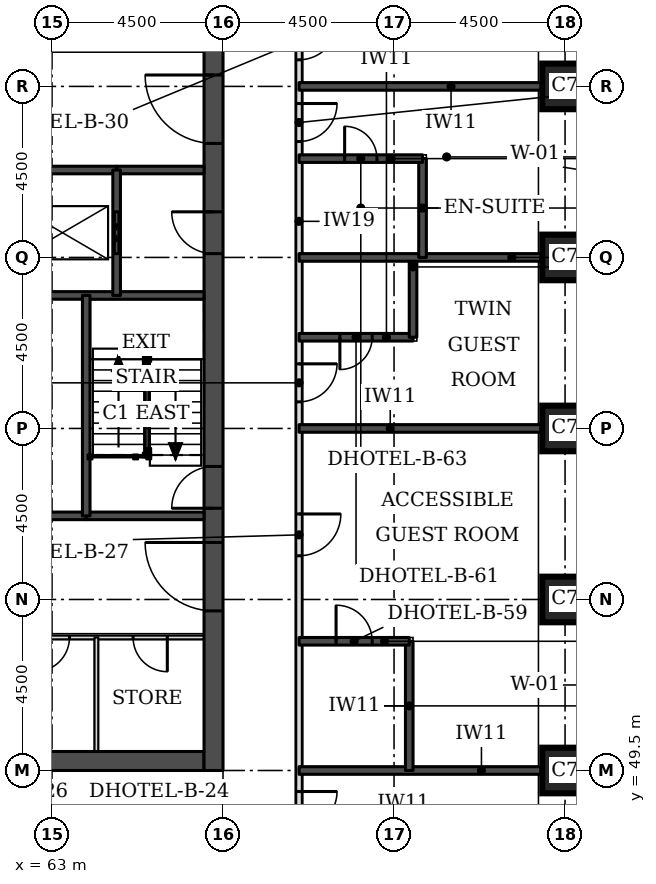
"""IFC4 building model, lengths in metres.
Left out: names, types, materials, properties, quantities, classifications, styles, units other than length and angle.
Written with IfcOpenShell. Run it as: python <this file> out.ifc"""

import sys

from ifc_helpers import new_model, si_unit, direction, frame, frame_2d, origin, origin_2d, place, context, subcontext, project, spatial, rectangle, extrude, element, fill, save


model = new_model("IFC4")
c1 = context("Model", 3, precision=1e-05, world=origin(), true_north=direction((0.0, 1.0)))
c2 = subcontext(c1, "Body", "Model", "MODEL_VIEW")
j1 = project(units=[si_unit("LENGTHUNIT", "METRE"), si_unit("PLANEANGLEUNIT", "RADIAN")], contexts=[c1])
p1 = place(None, origin())
s1 = spatial("IfcSite", under=j1, at=p1, CompositionType="ELEMENT")
p2 = place(p1, origin())
s2 = spatial("IfcBuilding", under=s1, at=p2, CompositionType="ELEMENT")
p3 = place(p2, frame((0.0, 0.0, 52.8)))
s3 = spatial("IfcBuildingStorey", under=s2, at=p3, CompositionType="ELEMENT", Elevation=52.8)
for number, where, z_axis, x_axis in (
    (1, (76.5, 49.5, 0.0), (0.0, 0.0, 1.0), (1.0, 0.0, 0.0)),
    (2, (76.5, 54.0, 0.0), (0.0, 0.0, 1.0), (1.0, 0.0, 0.0)),
    (3, (76.5, 58.5, 0.0), (0.0, 0.0, 1.0), (1.0, 0.0, 0.0)),
    (4, (76.5, 63.0, 0.0), (0.0, 0.0, 1.0), (1.0, 0.0, 0.0)),
    (5, (76.5, 67.5, 0.0), (0.0, 0.0, 1.0), (1.0, 0.0, 0.0)),
):
    element("IfcColumn", number, at=place(p3, frame(where, z_axis=z_axis, x_axis=x_axis)), inside=s3, PredefinedType="COLUMN", context=c2, shape_type="SweptSolid", body=[
        extrude(rectangle(XDim=1.2, YDim=1.2, at=origin_2d()), origin(), (0.0, 0.0, 1.0), 3.3),
    ])
p4 = place(p3, frame((45.5, 49.75, 0.0), z_axis=(0.0, 0.0, 1.0), x_axis=(1.0, 0.0, 0.0)))
e6 = element("IfcWall", 6, at=p4, inside=s3, PredefinedType="SHEAR", context=c2, shape_type="SweptSolid", body=[
    extrude(rectangle(XDim=21.5, YDim=0.5, at=frame_2d((10.75, 0.0))), origin(), (0.0, 0.0, 1.0), 3.3),
])
p5 = place(p3, frame((67.25, 49.5, 0.0), z_axis=(0.0, 0.0, 1.0), x_axis=(0.0, 1.0, 0.0)))
e7 = element("IfcWall", 7, at=p5, inside=s3, PredefinedType="SHEAR", context=c2, shape_type="SweptSolid", body=[
    extrude(rectangle(XDim=22.5, YDim=0.5, at=frame_2d((11.25, 0.0))), origin(), (0.0, 0.0, 1.0), 3.3),
])
p6 = place(p5, frame((4.2, 0.0, 0.0)))
e8 = element("IfcOpeningElement", 8, at=p6, cuts=e7, PredefinedType="OPENING", context=c2, shape_type="SweptSolid", body=[
    extrude(rectangle(XDim=1.8, YDim=2.1, at=frame_2d((0.9, 1.05))), frame((0.0, 0.26, 0.0), z_axis=(0.0, -1.0, 0.0), x_axis=(1.0, 0.0, 0.0)), (0.0, 0.0, 1.0), 0.52),
])
p7 = place(p5, frame((6.9, 0.0, 0.0)))
e9 = element("IfcOpeningElement", 9, at=p7, cuts=e7, PredefinedType="OPENING", context=c2, shape_type="SweptSolid", body=[
    extrude(rectangle(XDim=1.1, YDim=2.1, at=frame_2d((0.55, 1.05))), frame((0.0, 0.26, 0.0), z_axis=(0.0, -1.0, 0.0), x_axis=(1.0, 0.0, 0.0)), (0.0, 0.0, 1.0), 0.52),
])
p8 = place(p5, frame((13.6, 0.0, 0.0)))
e10 = element("IfcOpeningElement", 10, at=p8, cuts=e7, PredefinedType="OPENING", context=c2, shape_type="SweptSolid", body=[
    extrude(rectangle(XDim=1.1, YDim=2.1, at=frame_2d((0.55, 1.05))), frame((0.0, 0.26, 0.0), z_axis=(0.0, -1.0, 0.0), x_axis=(1.0, 0.0, 0.0)), (0.0, 0.0, 1.0), 0.52),
])
p9 = place(p5, frame((16.5, 0.0, 0.0)))
e11 = element("IfcOpeningElement", 11, at=p9, cuts=e7, PredefinedType="OPENING", context=c2, shape_type="SweptSolid", body=[
    extrude(rectangle(XDim=1.8, YDim=2.1, at=frame_2d((0.9, 1.05))), frame((0.0, 0.26, 0.0), z_axis=(0.0, -1.0, 0.0), x_axis=(1.0, 0.0, 0.0)), (0.0, 0.0, 1.0), 0.52),
])
p10 = place(p3, frame((69.5, 47.5, 0.0), z_axis=(0.0, 0.0, 1.0), x_axis=(0.0, 1.0, 0.0)))
e12 = element("IfcWall", 12, at=p10, inside=s3, PredefinedType="PARTITIONING", context=c2, shape_type="SweptSolid", body=[
    extrude(rectangle(XDim=26.5, YDim=0.15, at=frame_2d((13.25, 0.0))), origin(), (0.0, 0.0, 1.0), 3.08),
])
p11 = place(p10, frame((24.95, 0.0, 0.0)))
e13 = element("IfcOpeningElement", 13, at=p11, cuts=e12, PredefinedType="OPENING", context=c2, shape_type="SweptSolid", body=[
    extrude(rectangle(XDim=1.0, YDim=2.1, at=frame_2d((0.5, 1.05))), frame((0.0, 0.085, 0.0), z_axis=(0.0, -1.0, 0.0), x_axis=(1.0, 0.0, 0.0)), (0.0, 0.0, 1.0), 0.17),
])
p12 = place(p10, frame((20.7, 0.0, 0.0)))
e14 = element("IfcOpeningElement", 14, at=p12, cuts=e12, PredefinedType="OPENING", context=c2, shape_type="SweptSolid", body=[
    extrude(rectangle(XDim=1.0, YDim=2.1, at=frame_2d((0.5, 1.05))), frame((0.0, 0.085, 0.0), z_axis=(0.0, -1.0, 0.0), x_axis=(1.0, 0.0, 0.0)), (0.0, 0.0, 1.0), 0.17),
])
p13 = place(p10, frame((18.55, 0.0, 0.0)))
e15 = element("IfcOpeningElement", 15, at=p13, cuts=e12, PredefinedType="OPENING", context=c2, shape_type="SweptSolid", body=[
    extrude(rectangle(XDim=1.0, YDim=2.1, at=frame_2d((0.5, 1.05))), frame((0.0, 0.085, 0.0), z_axis=(0.0, -1.0, 0.0), x_axis=(1.0, 0.0, 0.0)), (0.0, 0.0, 1.0), 0.17),
])
p14 = place(p10, frame((11.7, 0.0, 0.0)))
e16 = element("IfcOpeningElement", 16, at=p14, cuts=e12, PredefinedType="OPENING", context=c2, shape_type="SweptSolid", body=[
    extrude(rectangle(XDim=1.0, YDim=2.1, at=frame_2d((0.5, 1.05))), frame((0.0, 0.085, 0.0), z_axis=(0.0, -1.0, 0.0), x_axis=(1.0, 0.0, 0.0)), (0.0, 0.0, 1.0), 0.17),
])
p15 = place(p10, frame((7.65, 0.0, 0.0)))
e17 = element("IfcOpeningElement", 17, at=p15, cuts=e12, PredefinedType="OPENING", context=c2, shape_type="SweptSolid", body=[
    extrude(rectangle(XDim=1.1, YDim=2.1, at=frame_2d((0.55, 1.05))), frame((0.0, 0.085, 0.0), z_axis=(0.0, -1.0, 0.0), x_axis=(1.0, 0.0, 0.0)), (0.0, 0.0, 1.0), 0.17),
])
p16 = place(p10, frame((0.447, 0.0, 0.0)))
e18 = element("IfcOpeningElement", 18, at=p16, cuts=e12, PredefinedType="OPENING", context=c2, shape_type="SweptSolid", body=[
    extrude(rectangle(XDim=1.0, YDim=2.1, at=frame_2d((0.5, 1.05))), frame((0.0, 0.085, 0.0), z_axis=(0.0, -1.0, 0.0), x_axis=(1.0, 0.0, 0.0)), (0.0, 0.0, 1.0), 0.17),
])
p17 = place(p3, frame((69.5, 49.5, 0.0), z_axis=(0.0, 0.0, 1.0), x_axis=(1.0, 0.0, 0.0)))
e19 = element("IfcWall", 19, at=p17, inside=s3, PredefinedType="SOLIDWALL", context=c2, shape_type="SweptSolid", body=[
    extrude(rectangle(XDim=6.4, YDim=0.2, at=frame_2d((3.2, 0.0))), origin(), (0.0, 0.0, 1.0), 3.08),
])
p18 = place(p3, frame((72.4, 49.5, 0.0), z_axis=(0.0, 0.0, 1.0), x_axis=(0.0, 1.0, 0.0)))
e20 = element("IfcWall", 20, at=p18, inside=s3, PredefinedType="SOLIDWALL", context=c2, shape_type="SweptSolid", body=[
    extrude(rectangle(XDim=3.4, YDim=0.2, at=frame_2d((1.7, 0.0))), origin(), (0.0, 0.0, 1.0), 3.08),
])
p19 = place(p3, frame((69.5, 52.9, 0.0), z_axis=(0.0, 0.0, 1.0), x_axis=(1.0, 0.0, 0.0)))
e21 = element("IfcWall", 21, at=p19, inside=s3, PredefinedType="SOLIDWALL", context=c2, shape_type="SweptSolid", body=[
    extrude(rectangle(XDim=2.9, YDim=0.2, at=frame_2d((1.45, 0.0))), origin(), (0.0, 0.0, 1.0), 3.08),
])
p20 = place(p19, frame((0.975, 0.0, 0.0)))
e22 = element("IfcOpeningElement", 22, at=p20, cuts=e21, PredefinedType="OPENING", context=c2, shape_type="SweptSolid", body=[
    extrude(rectangle(XDim=0.95, YDim=2.1, at=frame_2d((0.475, 1.05))), frame((0.0, 0.11, 0.0), z_axis=(0.0, -1.0, 0.0), x_axis=(1.0, 0.0, 0.0)), (0.0, 0.0, 1.0), 0.22),
])
p21 = place(p3, frame((69.5, 58.5, 0.0), z_axis=(0.0, 0.0, 1.0), x_axis=(1.0, 0.0, 0.0)))
e23 = element("IfcWall", 23, at=p21, inside=s3, PredefinedType="SOLIDWALL", context=c2, shape_type="SweptSolid", body=[
    extrude(rectangle(XDim=6.4, YDim=0.2, at=frame_2d((3.2, 0.0))), origin(), (0.0, 0.0, 1.0), 3.08),
])
p22 = place(p3, frame((69.5, 60.9, 0.0), z_axis=(0.0, 0.0, 1.0), x_axis=(1.0, 0.0, 0.0)))
e24 = element("IfcWall", 24, at=p22, inside=s3, PredefinedType="SOLIDWALL", context=c2, shape_type="SweptSolid", body=[
    extrude(rectangle(XDim=3.0, YDim=0.2, at=frame_2d((1.5, 0.0))), origin(), (0.0, 0.0, 1.0), 3.08),
])
p23 = place(p22, frame((1.075, 0.0, 0.0)))
e25 = element("IfcOpeningElement", 25, at=p23, cuts=e24, PredefinedType="OPENING", context=c2, shape_type="SweptSolid", body=[
    extrude(rectangle(XDim=0.85, YDim=2.1, at=frame_2d((0.425, 1.05))), frame((0.0, 0.11, 0.0), z_axis=(0.0, -1.0, 0.0), x_axis=(1.0, 0.0, 0.0)), (0.0, 0.0, 1.0), 0.22),
])
p24 = place(p3, frame((72.5, 60.9, 0.0), z_axis=(0.0, 0.0, 1.0), x_axis=(0.0, 1.0, 0.0)))
e26 = element("IfcWall", 26, at=p24, inside=s3, PredefinedType="SOLIDWALL", context=c2, shape_type="SweptSolid", body=[
    extrude(rectangle(XDim=2.1, YDim=0.2, at=frame_2d((1.05, 0.0))), origin(), (0.0, 0.0, 1.0), 3.08),
])
p25 = place(p3, frame((69.5, 63.0, 0.0), z_axis=(0.0, 0.0, 1.0), x_axis=(1.0, 0.0, 0.0)))
e27 = element("IfcWall", 27, at=p25, inside=s3, PredefinedType="SOLIDWALL", context=c2, shape_type="SweptSolid", body=[
    extrude(rectangle(XDim=6.4, YDim=0.2, at=frame_2d((3.2, 0.0))), origin(), (0.0, 0.0, 1.0), 3.08),
])
p26 = place(p3, frame((72.75, 63.0, 0.0), z_axis=(0.0, 0.0, 1.0), x_axis=(0.0, 1.0, 0.0)))
e28 = element("IfcWall", 28, at=p26, inside=s3, PredefinedType="SOLIDWALL", context=c2, shape_type="SweptSolid", body=[
    extrude(rectangle(XDim=2.6, YDim=0.2, at=frame_2d((1.3, 0.0))), origin(), (0.0, 0.0, 1.0), 3.08),
])
p27 = place(p3, frame((69.5, 65.6, 0.0), z_axis=(0.0, 0.0, 1.0), x_axis=(1.0, 0.0, 0.0)))
e29 = element("IfcWall", 29, at=p27, inside=s3, PredefinedType="SOLIDWALL", context=c2, shape_type="SweptSolid", body=[
    extrude(rectangle(XDim=3.25, YDim=0.2, at=frame_2d((1.625, 0.0))), origin(), (0.0, 0.0, 1.0), 3.08),
])
p28 = place(p27, frame((1.2, 0.0, 0.0)))
e30 = element("IfcOpeningElement", 30, at=p28, cuts=e29, PredefinedType="OPENING", context=c2, shape_type="SweptSolid", body=[
    extrude(rectangle(XDim=0.85, YDim=2.1, at=frame_2d((0.425, 1.05))), frame((0.0, 0.11, 0.0), z_axis=(0.0, -1.0, 0.0), x_axis=(1.0, 0.0, 0.0)), (0.0, 0.0, 1.0), 0.22),
])
p29 = place(p3, frame((69.5, 67.5, 0.0), z_axis=(0.0, 0.0, 1.0), x_axis=(1.0, 0.0, 0.0)))
e31 = element("IfcWall", 31, at=p29, inside=s3, PredefinedType="SOLIDWALL", context=c2, shape_type="SweptSolid", body=[
    extrude(rectangle(XDim=6.4, YDim=0.2, at=frame_2d((3.2, 0.0))), origin(), (0.0, 0.0, 1.0), 3.08),
])
p30 = place(p3, frame((61.85, 53.0, 0.0), z_axis=(0.0, 0.0, 1.0), x_axis=(1.0, 0.0, 0.0)))
e32 = element("IfcWall", 32, at=p30, inside=s3, PredefinedType="PARTITIONING", context=c2, shape_type="SweptSolid", body=[
    extrude(rectangle(XDim=5.15, YDim=0.1, at=frame_2d((2.575, 0.0))), origin(), (0.0, 0.0, 1.0), 3.08),
])
p31 = place(p30, frame((3.284, 0.0, 0.0)))
e33 = element("IfcOpeningElement", 33, at=p31, cuts=e32, PredefinedType="OPENING", context=c2, shape_type="SweptSolid", body=[
    extrude(rectangle(XDim=0.9, YDim=2.1, at=frame_2d((0.45, 1.05))), frame((0.0, 0.06, 0.0), z_axis=(0.0, -1.0, 0.0), x_axis=(1.0, 0.0, 0.0)), (0.0, 0.0, 1.0), 0.12),
])
p32 = place(p30, frame((0.709, 0.0, 0.0)))
e34 = element("IfcOpeningElement", 34, at=p32, cuts=e32, PredefinedType="OPENING", context=c2, shape_type="SweptSolid", body=[
    extrude(rectangle(XDim=0.9, YDim=2.1, at=frame_2d((0.45, 1.05))), frame((0.0, 0.06, 0.0), z_axis=(0.0, -1.0, 0.0), x_axis=(1.0, 0.0, 0.0)), (0.0, 0.0, 1.0), 0.12),
])
p33 = place(p3, frame((61.85, 56.2, 0.0), z_axis=(0.0, 0.0, 1.0), x_axis=(1.0, 0.0, 0.0)))
e35 = element("IfcWall", 35, at=p33, inside=s3, PredefinedType="SOLIDWALL", context=c2, shape_type="SweptSolid", body=[
    extrude(rectangle(XDim=2.05, YDim=0.2, at=frame_2d((1.025, 0.0))), origin(), (0.0, 0.0, 1.0), 3.08),
])
p34 = place(p3, frame((63.9, 56.2, 0.0), z_axis=(0.0, 0.0, 1.0), x_axis=(1.0, 0.0, 0.0)))
e36 = element("IfcWall", 36, at=p34, inside=s3, PredefinedType="SOLIDWALL", context=c2, shape_type="SweptSolid", body=[
    extrude(rectangle(XDim=3.1, YDim=0.2, at=frame_2d((1.55, 0.0))), origin(), (0.0, 0.0, 1.0), 3.08),
])
p35 = place(p3, frame((61.85, 62.0, 0.0), z_axis=(0.0, 0.0, 1.0), x_axis=(1.0, 0.0, 0.0)))
e37 = element("IfcWall", 37, at=p35, inside=s3, PredefinedType="SOLIDWALL", context=c2, shape_type="SweptSolid", body=[
    extrude(rectangle(XDim=5.15, YDim=0.2, at=frame_2d((2.575, 0.0))), origin(), (0.0, 0.0, 1.0), 3.08),
])
p36 = place(p3, frame((64.7, 65.3, 0.0), z_axis=(0.0, 0.0, 1.0), x_axis=(1.0, 0.0, 0.0)))
e38 = element("IfcWall", 38, at=p36, inside=s3, PredefinedType="SOLIDWALL", context=c2, shape_type="SweptSolid", body=[
    extrude(rectangle(XDim=2.3, YDim=0.2, at=frame_2d((1.15, 0.0))), origin(), (0.0, 0.0, 1.0), 3.08),
])
p37 = place(p3, frame((47.8, 65.3, 0.0), z_axis=(0.0, 0.0, 1.0), x_axis=(1.0, 0.0, 0.0)))
e39 = element("IfcWall", 39, at=p37, inside=s3, PredefinedType="SOLIDWALL", context=c2, shape_type="SweptSolid", body=[
    extrude(rectangle(XDim=16.9, YDim=0.2, at=frame_2d((8.45, 0.0))), origin(), (0.0, 0.0, 1.0), 3.08),
])
p38 = place(p3, frame((63.9, 56.2, 0.0), z_axis=(0.0, 0.0, 1.0), x_axis=(0.0, 1.0, 0.0)))
e40 = element("IfcWall", 40, at=p38, inside=s3, PredefinedType="SOLIDWALL", context=c2, shape_type="SweptSolid", body=[
    extrude(rectangle(XDim=5.8, YDim=0.2, at=frame_2d((2.9, 0.0))), origin(), (0.0, 0.0, 1.0), 3.08),
])
p39 = place(p3, frame((64.167, 50.0, 0.0), z_axis=(0.0, 0.0, 1.0), x_axis=(0.0, 1.0, 0.0)))
e41 = element("IfcWall", 41, at=p39, inside=s3, PredefinedType="PARTITIONING", context=c2, shape_type="SweptSolid", body=[
    extrude(rectangle(XDim=3.0, YDim=0.1, at=frame_2d((1.5, 0.0))), origin(), (0.0, 0.0, 1.0), 3.08),
])
p40 = place(p3, frame((64.7, 62.0, 0.0), z_axis=(0.0, 0.0, 1.0), x_axis=(0.0, 1.0, 0.0)))
e42 = element("IfcWall", 42, at=p40, inside=s3, PredefinedType="SOLIDWALL", context=c2, shape_type="SweptSolid", body=[
    extrude(rectangle(XDim=3.3, YDim=0.2, at=frame_2d((1.65, 0.0))), origin(), (0.0, 0.0, 1.0), 3.08),
])
p41 = place(p40, frame((1.1, 0.0, 0.0)))
e43 = element("IfcOpeningElement", 43, at=p41, cuts=e42, PredefinedType="OPENING", context=c2, shape_type="SweptSolid", body=[
    extrude(rectangle(XDim=1.1, YDim=2.1, at=frame_2d((0.55, 1.05))), frame((0.0, 0.11, 0.0), z_axis=(0.0, -1.0, 0.0), x_axis=(1.0, 0.0, 0.0)), (0.0, 0.0, 1.0), 0.22),
])
p42 = place(p12, frame((1.0, 0.0, 0.0), z_axis=(0.0, 0.0, 1.0), x_axis=(-1.0, 0.0, 0.0)))
e44 = element("IfcDoor", 44, at=p42, inside=s3, OperationType="SINGLE_SWING_LEFT", PredefinedType="DOOR", context=c2, shape_type="SweptSolid", body=[
    extrude(rectangle(XDim=1.0, YDim=2.1, at=frame_2d((0.5, 1.05))), frame((0.0, 0.025, 0.0), z_axis=(0.0, -1.0, 0.0), x_axis=(1.0, 0.0, 0.0)), (0.0, 0.0, 1.0), 0.05),
])
fill(e14, e44)
p43 = place(p13, frame((1.0, 0.0, 0.0), z_axis=(0.0, 0.0, 1.0), x_axis=(-1.0, 0.0, 0.0)))
e45 = element("IfcDoor", 45, at=p43, inside=s3, OperationType="SINGLE_SWING_LEFT", PredefinedType="DOOR", context=c2, shape_type="SweptSolid", body=[
    extrude(rectangle(XDim=1.0, YDim=2.1, at=frame_2d((0.5, 1.05))), frame((0.0, 0.025, 0.0), z_axis=(0.0, -1.0, 0.0), x_axis=(1.0, 0.0, 0.0)), (0.0, 0.0, 1.0), 0.05),
])
fill(e15, e45)
p44 = place(p28, origin())
e46 = element("IfcDoor", 46, at=p44, inside=s3, OperationType="SINGLE_SWING_LEFT", PredefinedType="DOOR", context=c2, shape_type="SweptSolid", body=[
    extrude(rectangle(XDim=0.85, YDim=2.1, at=frame_2d((0.425, 1.05))), frame((0.0, 0.025, 0.0), z_axis=(0.0, -1.0, 0.0), x_axis=(1.0, 0.0, 0.0)), (0.0, 0.0, 1.0), 0.05),
])
fill(e30, e46)
p45 = place(p14, frame((1.0, 0.0, 0.0), z_axis=(0.0, 0.0, 1.0), x_axis=(-1.0, 0.0, 0.0)))
e47 = element("IfcDoor", 47, at=p45, inside=s3, OperationType="SINGLE_SWING_LEFT", PredefinedType="DOOR", context=c2, shape_type="SweptSolid", body=[
    extrude(rectangle(XDim=1.0, YDim=2.1, at=frame_2d((0.5, 1.05))), frame((0.0, 0.025, 0.0), z_axis=(0.0, -1.0, 0.0), x_axis=(1.0, 0.0, 0.0)), (0.0, 0.0, 1.0), 0.05),
])
fill(e16, e47)
p46 = place(p23, frame((0.85, 0.0, 0.0), z_axis=(0.0, 0.0, 1.0), x_axis=(-1.0, 0.0, 0.0)))
e48 = element("IfcDoor", 48, at=p46, inside=s3, OperationType="SINGLE_SWING_RIGHT", PredefinedType="DOOR", context=c2, shape_type="SweptSolid", body=[
    extrude(rectangle(XDim=0.85, YDim=2.1, at=frame_2d((0.425, 1.05))), frame((0.0, 0.025, 0.0), z_axis=(0.0, -1.0, 0.0), x_axis=(1.0, 0.0, 0.0)), (0.0, 0.0, 1.0), 0.05),
])
fill(e25, e48)
p47 = place(p15, frame((1.1, 0.0, 0.0), z_axis=(0.0, 0.0, 1.0), x_axis=(-1.0, 0.0, 0.0)))
e49 = element("IfcDoor", 49, at=p47, inside=s3, OperationType="SINGLE_SWING_LEFT", PredefinedType="DOOR", context=c2, shape_type="SweptSolid", body=[
    extrude(rectangle(XDim=1.1, YDim=2.1, at=frame_2d((0.55, 1.05))), frame((0.0, 0.025, 0.0), z_axis=(0.0, -1.0, 0.0), x_axis=(1.0, 0.0, 0.0)), (0.0, 0.0, 1.0), 0.05),
])
fill(e17, e49)
p48 = place(p20, origin())
e50 = element("IfcDoor", 50, at=p48, inside=s3, OperationType="SINGLE_SWING_LEFT", PredefinedType="DOOR", context=c2, shape_type="SweptSolid", body=[
    extrude(rectangle(XDim=0.95, YDim=2.1, at=frame_2d((0.475, 1.05))), frame((0.0, 0.025, 0.0), z_axis=(0.0, -1.0, 0.0), x_axis=(1.0, 0.0, 0.0)), (0.0, 0.0, 1.0), 0.05),
])
fill(e22, e50)
p49 = place(p16, frame((1.0, 0.0, 0.0), z_axis=(0.0, 0.0, 1.0), x_axis=(-1.0, 0.0, 0.0)))
e51 = element("IfcDoor", 51, at=p49, inside=s3, OperationType="SINGLE_SWING_LEFT", PredefinedType="DOOR", context=c2, shape_type="SweptSolid", body=[
    extrude(rectangle(XDim=1.0, YDim=2.1, at=frame_2d((0.5, 1.05))), frame((0.0, 0.025, 0.0), z_axis=(0.0, -1.0, 0.0), x_axis=(1.0, 0.0, 0.0)), (0.0, 0.0, 1.0), 0.05),
])
fill(e18, e51)
p50 = place(p41, origin())
e52 = element("IfcDoor", 52, at=p50, inside=s3, OperationType="DOUBLE_DOOR_SLIDING", PredefinedType="DOOR", context=c2, shape_type="SweptSolid", body=[
    extrude(rectangle(XDim=1.1, YDim=2.1, at=frame_2d((0.55, 1.05))), frame((0.0, 0.025, 0.0), z_axis=(0.0, -1.0, 0.0), x_axis=(1.0, 0.0, 0.0)), (0.0, 0.0, 1.0), 0.05),
])
fill(e43, e52)
p51 = place(p6, origin())
e53 = element("IfcDoor", 53, at=p51, inside=s3, OperationType="SINGLE_SWING_RIGHT", PredefinedType="DOOR", context=c2, shape_type="SweptSolid", body=[
    extrude(rectangle(XDim=1.8, YDim=2.1, at=frame_2d((0.9, 1.05))), frame((0.0, 0.025, 0.0), z_axis=(0.0, -1.0, 0.0), x_axis=(1.0, 0.0, 0.0)), (0.0, 0.0, 1.0), 0.05),
])
fill(e8, e53)
p52 = place(p7, origin())
e54 = element("IfcDoor", 54, at=p52, inside=s3, OperationType="SINGLE_SWING_LEFT", PredefinedType="DOOR", context=c2, shape_type="SweptSolid", body=[
    extrude(rectangle(XDim=1.1, YDim=2.1, at=frame_2d((0.55, 1.05))), frame((0.0, 0.025, 0.0), z_axis=(0.0, -1.0, 0.0), x_axis=(1.0, 0.0, 0.0)), (0.0, 0.0, 1.0), 0.05),
])
fill(e9, e54)
p53 = place(p8, origin())
e55 = element("IfcDoor", 55, at=p53, inside=s3, OperationType="SINGLE_SWING_RIGHT", PredefinedType="DOOR", context=c2, shape_type="SweptSolid", body=[
    extrude(rectangle(XDim=1.1, YDim=2.1, at=frame_2d((0.55, 1.05))), frame((0.0, 0.025, 0.0), z_axis=(0.0, -1.0, 0.0), x_axis=(1.0, 0.0, 0.0)), (0.0, 0.0, 1.0), 0.05),
])
fill(e10, e55)
p54 = place(p9, origin())
e56 = element("IfcDoor", 56, at=p54, inside=s3, OperationType="SINGLE_SWING_RIGHT", PredefinedType="DOOR", context=c2, shape_type="SweptSolid", body=[
    extrude(rectangle(XDim=1.8, YDim=2.1, at=frame_2d((0.9, 1.05))), frame((0.0, 0.025, 0.0), z_axis=(0.0, -1.0, 0.0), x_axis=(1.0, 0.0, 0.0)), (0.0, 0.0, 1.0), 0.05),
])
fill(e11, e56)
p55 = place(p31, frame((0.9, 0.0, 0.0), z_axis=(0.0, 0.0, 1.0), x_axis=(-1.0, 0.0, 0.0)))
e57 = element("IfcDoor", 57, at=p55, inside=s3, OperationType="SINGLE_SWING_LEFT", PredefinedType="DOOR", context=c2, shape_type="SweptSolid", body=[
    extrude(rectangle(XDim=0.9, YDim=2.1, at=frame_2d((0.45, 1.05))), frame((0.0, 0.025, 0.0), z_axis=(0.0, -1.0, 0.0), x_axis=(1.0, 0.0, 0.0)), (0.0, 0.0, 1.0), 0.05),
])
fill(e33, e57)
p56 = place(p32, frame((0.9, 0.0, 0.0), z_axis=(0.0, 0.0, 1.0), x_axis=(-1.0, 0.0, 0.0)))
e58 = element("IfcDoor", 58, at=p56, inside=s3, OperationType="SINGLE_SWING_RIGHT", PredefinedType="DOOR", context=c2, shape_type="SweptSolid", body=[
    extrude(rectangle(XDim=0.9, YDim=2.1, at=frame_2d((0.45, 1.05))), frame((0.0, 0.025, 0.0), z_axis=(0.0, -1.0, 0.0), x_axis=(1.0, 0.0, 0.0)), (0.0, 0.0, 1.0), 0.05),
])
fill(e34, e58)
save(model, sys.argv[1])
